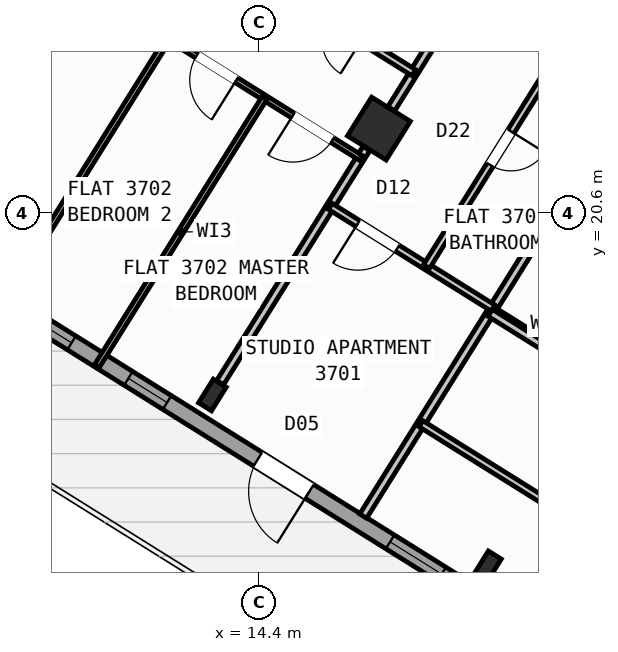
"""IFC4 building model, lengths in metres.
Left out: names, types, materials, properties, quantities, classifications, styles, units other than length and angle.
Written with IfcOpenShell. Run it as: python <this file> out.ifc"""

import sys

from ifc_helpers import new_model, si_unit, direction, frame, frame_2d, origin, origin_2d, place, context, subcontext, project, spatial, rectangle, hollow_rectangle, i_section, extrude, source, transform, mapped, element, fill, save


model = new_model("IFC4")
c1 = context("Model", 3, precision=1e-05, world=origin(), true_north=direction((0.0, 1.0)))
c2 = subcontext(c1, "Body", "Model", "MODEL_VIEW")
j1 = project(units=[si_unit("LENGTHUNIT", "METRE"), si_unit("PLANEANGLEUNIT", "RADIAN")], contexts=[c1])
p1 = place(None, origin())
s1 = spatial("IfcSite", under=j1, at=p1, CompositionType="ELEMENT")
p2 = place(p1, origin())
s2 = spatial("IfcBuilding", under=s1, at=p2, CompositionType="ELEMENT")
p3 = place(p2, frame((0.0, 0.0, 147.9)))
s3 = spatial("IfcBuildingStorey", under=s2, at=p3, CompositionType="ELEMENT", Elevation=147.9)
m1 = source(origin(), c2, "Body", "SweptSolid", [
    extrude(i_section(OverallWidth=0.3, OverallDepth=0.55, WebThickness=0.015, FlangeThickness=0.029, at=origin_2d()), origin(), (0.0, 0.0, 1.0), 3.6),
])
p4 = place(p3, frame((18.906, 13.612, 0.0), z_axis=(0.0, 0.0, 1.0), x_axis=(-0.848048096156, 0.529919264233, 0.0)))
e1 = element("IfcColumn", 1, at=p4, inside=s3, PredefinedType="COLUMN", context=c2, shape_type="MappedRepresentation", body=[
    mapped(m1, transform((0.0, 0.0, 0.0), scale=1.0)),
])
m2 = source(origin(), c2, "Body", "SweptSolid", [
    extrude(hollow_rectangle(XDim=0.9, YDim=0.9, WallThickness=0.036, at=origin_2d()), origin(), (0.0, 0.0, 1.0), 3.6),
])
p5 = place(p3, frame((16.764, 22.261, 0.0), z_axis=(0.0, 0.0, 1.0), x_axis=(-0.848048096156, 0.529919264233, 0.0)))
e2 = element("IfcColumn", 2, at=p5, inside=s3, PredefinedType="COLUMN", context=c2, shape_type="MappedRepresentation", body=[
    mapped(m2, transform((0.0, 0.0, 0.0), scale=1.0)),
])
p6 = place(p3, frame((13.478, 17.003, 0.0), z_axis=(0.0, 0.0, 1.0), x_axis=(-0.848048096156, 0.529919264233, 0.0)))
e3 = element("IfcColumn", 3, at=p6, inside=s3, PredefinedType="COLUMN", context=c2, shape_type="MappedRepresentation", body=[
    mapped(m1, transform((0.0, 0.0, 0.0), scale=1.0)),
])
p7 = place(p3, frame((29.268, 6.429, 0.0), z_axis=(0.0, 0.0, 1.0), x_axis=(-0.848049971435, 0.529916263149, 0.0)))
e4 = element("IfcWall", 4, at=p7, inside=s3, PredefinedType="STANDARD", context=c2, shape_type="SweptSolid", body=[
    extrude(rectangle(XDim=31.588, YDim=0.32, at=frame_2d((15.794, 0.0))), origin(), (0.0, 0.0, 1.0), 3.35),
])
p8 = place(p7, frame((16.362, 0.0, 0.0)))
e5 = element("IfcOpeningElement", 5, at=p8, cuts=e4, PredefinedType="OPENING", context=c2, shape_type="SweptSolid", body=[
    extrude(rectangle(XDim=1.2, YDim=2.15, at=frame_2d((0.6, 1.075))), frame((0.0, 0.17, 0.0), z_axis=(0.0, -1.0, 0.0), x_axis=(1.0, 0.0, 0.0)), (0.0, 0.0, 1.0), 0.34),
])
p9 = place(p7, frame((2.989, 0.0, 0.8)))
e6 = element("IfcOpeningElement", 6, at=p9, cuts=e4, PredefinedType="OPENING", context=c2, shape_type="SweptSolid", body=[
    extrude(rectangle(XDim=2.1, YDim=1.55, at=frame_2d((1.05, 0.775))), frame((0.0, 0.17, 0.0), z_axis=(0.0, -1.0, 0.0), x_axis=(1.0, 0.0, 0.0)), (0.0, 0.0, 1.0), 0.34),
])
p10 = place(p7, frame((8.359, 0.0, 0.8)))
e7 = element("IfcOpeningElement", 7, at=p10, cuts=e4, PredefinedType="OPENING", context=c2, shape_type="SweptSolid", body=[
    extrude(rectangle(XDim=2.1, YDim=1.55, at=frame_2d((1.05, 0.775))), frame((0.0, 0.17, 0.0), z_axis=(0.0, -1.0, 0.0), x_axis=(1.0, 0.0, 0.0)), (0.0, 0.0, 1.0), 0.34),
])
p11 = place(p7, frame((13.284, 0.0, 0.95)))
e8 = element("IfcOpeningElement", 8, at=p11, cuts=e4, PredefinedType="OPENING", context=c2, shape_type="SweptSolid", body=[
    extrude(rectangle(XDim=1.2, YDim=1.4, at=frame_2d((0.6, 0.7))), frame((0.0, 0.17, 0.0), z_axis=(0.0, -1.0, 0.0), x_axis=(1.0, 0.0, 0.0)), (0.0, 0.0, 1.0), 0.34),
])
p12 = place(p7, frame((29.188, 0.0, 0.95)))
e9 = element("IfcOpeningElement", 9, at=p12, cuts=e4, PredefinedType="OPENING", context=c2, shape_type="SweptSolid", body=[
    extrude(rectangle(XDim=1.2, YDim=1.4, at=frame_2d((0.6, 0.7))), frame((0.0, 0.17, 0.0), z_axis=(0.0, -1.0, 0.0), x_axis=(1.0, 0.0, 0.0)), (0.0, 0.0, 1.0), 0.34),
])
p13 = place(p7, frame((19.674, 0.0, 1.0)))
e10 = element("IfcOpeningElement", 10, at=p13, cuts=e4, PredefinedType="OPENING", context=c2, shape_type="SweptSolid", body=[
    extrude(rectangle(XDim=0.9, YDim=1.25, at=frame_2d((0.45, 0.625))), frame((0.0, 0.17, 0.0), z_axis=(0.0, -1.0, 0.0), x_axis=(1.0, 0.0, 0.0)), (0.0, 0.0, 1.0), 0.34),
])
p14 = place(p7, frame((21.896, 0.0, 1.0)))
e11 = element("IfcOpeningElement", 11, at=p14, cuts=e4, PredefinedType="OPENING", context=c2, shape_type="SweptSolid", body=[
    extrude(rectangle(XDim=0.9, YDim=1.25, at=frame_2d((0.45, 0.625))), frame((0.0, 0.17, 0.0), z_axis=(0.0, -1.0, 0.0), x_axis=(1.0, 0.0, 0.0)), (0.0, 0.0, 1.0), 0.34),
])
p15 = place(p7, frame((24.106, 0.0, 1.0)))
e12 = element("IfcOpeningElement", 12, at=p15, cuts=e4, PredefinedType="OPENING", context=c2, shape_type="SweptSolid", body=[
    extrude(rectangle(XDim=0.65, YDim=1.15, at=frame_2d((0.325, 0.575))), frame((0.0, 0.17, 0.0), z_axis=(0.0, -1.0, 0.0), x_axis=(1.0, 0.0, 0.0)), (0.0, 0.0, 1.0), 0.34),
])
p16 = place(p7, frame((26.366, 0.0, 1.0)))
e13 = element("IfcOpeningElement", 13, at=p16, cuts=e4, PredefinedType="OPENING", context=c2, shape_type="SweptSolid", body=[
    extrude(rectangle(XDim=0.9, YDim=1.25, at=frame_2d((0.45, 0.625))), frame((0.0, 0.17, 0.0), z_axis=(0.0, -1.0, 0.0), x_axis=(1.0, 0.0, 0.0)), (0.0, 0.0, 1.0), 0.34),
])
p17 = place(p3, frame((2.415, 23.452, 0.0), z_axis=(0.0, 0.0, 1.0), x_axis=(0.52991049553, 0.848053575387, 0.0)))
e14 = element("IfcWall", 14, at=p17, inside=s3, PredefinedType="STANDARD", context=c2, shape_type="SweptSolid", body=[
    extrude(rectangle(XDim=21.587, YDim=0.32, at=frame_2d((10.794, 0.0))), origin(), (0.0, 0.0, 1.0), 2.775),
])
p18 = place(p17, frame((2.356, 0.0, 0.8)))
e15 = element("IfcOpeningElement", 15, at=p18, cuts=e14, PredefinedType="OPENING", context=c2, shape_type="SweptSolid", body=[
    extrude(rectangle(XDim=2.1, YDim=1.55, at=frame_2d((1.05, 0.775))), frame((0.0, 0.17, 0.0), z_axis=(0.0, -1.0, 0.0), x_axis=(1.0, 0.0, 0.0)), (0.0, 0.0, 1.0), 0.34),
])
p19 = place(p17, frame((8.639, 0.0, 1.0)))
e16 = element("IfcOpeningElement", 16, at=p19, cuts=e14, PredefinedType="OPENING", context=c2, shape_type="SweptSolid", body=[
    extrude(rectangle(XDim=0.9, YDim=1.25, at=frame_2d((0.45, 0.625))), frame((0.0, 0.17, 0.0), z_axis=(0.0, -1.0, 0.0), x_axis=(1.0, 0.0, 0.0)), (0.0, 0.0, 1.0), 0.34),
])
p20 = place(p17, frame((17.744, 0.0, 0.85)))
e17 = element("IfcOpeningElement", 17, at=p20, cuts=e14, PredefinedType="OPENING", context=c2, shape_type="SweptSolid", body=[
    extrude(rectangle(XDim=1.5, YDim=1.5, at=frame_2d((0.75, 0.75))), frame((0.0, 0.17, 0.0), z_axis=(0.0, -1.0, 0.0), x_axis=(1.0, 0.0, 0.0)), (0.0, 0.0, 1.0), 0.34),
])
p21 = place(p3, frame((21.206, 17.292, 0.0), z_axis=(0.0, 0.0, 1.0), x_axis=(-0.848050851465, 0.529914854792, 0.0)))
e18 = element("IfcWall", 18, at=p21, inside=s3, PredefinedType="PARTITIONING", context=c2, shape_type="SweptSolid", body=[
    extrude(rectangle(XDim=2.61, YDim=0.16, at=frame_2d((1.305, 0.0))), origin(), (0.0, 0.0, 1.0), 3.34),
])
p22 = place(p3, frame((21.938, 23.391, 0.0), z_axis=(0.0, 0.0, 1.0), x_axis=(-0.529924725692, -0.848044683434, 0.0)))
e19 = element("IfcWall", 19, at=p22, inside=s3, PredefinedType="PARTITIONING", context=c2, shape_type="SweptSolid", body=[
    extrude(rectangle(XDim=10.35, YDim=0.16, at=frame_2d((5.175, 0.0))), origin(), (0.0, 0.0, 1.0), 3.34),
])
p23 = place(p3, frame((21.938, 23.391, 0.0), z_axis=(0.0, 0.0, 1.0), x_axis=(-0.848045850158, 0.529922858565, 0.0)))
e20 = element("IfcWall", 20, at=p23, inside=s3, PredefinedType="PARTITIONING", context=c2, shape_type="SweptSolid", body=[
    extrude(rectangle(XDim=16.73, YDim=0.16, at=frame_2d((8.365, 0.0))), origin(), (0.0, 0.0, 1.0), 3.34),
])
p24 = place(p23, frame((2.22, 0.0, 0.0)))
e21 = element("IfcOpeningElement", 21, at=p24, cuts=e20, PredefinedType="OPENING", context=c2, shape_type="SweptSolid", body=[
    extrude(rectangle(XDim=0.86, YDim=2.05, at=frame_2d((0.43, 1.025))), frame((0.0, 0.09, 0.0), z_axis=(0.0, -1.0, 0.0), x_axis=(1.0, 0.0, 0.0)), (0.0, 0.0, 1.0), 0.18),
])
p25 = place(p23, frame((14.22, 0.0, 0.0)))
e22 = element("IfcOpeningElement", 22, at=p25, cuts=e20, PredefinedType="OPENING", context=c2, shape_type="SweptSolid", body=[
    extrude(rectangle(XDim=1.0, YDim=2.1, at=frame_2d((0.5, 1.05))), frame((0.0, 0.09, 0.0), z_axis=(0.0, -1.0, 0.0), x_axis=(1.0, 0.0, 0.0)), (0.0, 0.0, 1.0), 0.18),
])
p26 = place(p3, frame((18.724, 25.399, 0.0), z_axis=(0.0, 0.0, 1.0), x_axis=(-0.529890499457, -0.848066069705, 0.0)))
e23 = element("IfcWall", 23, at=p26, inside=s3, PredefinedType="PARTITIONING", context=c2, shape_type="SweptSolid", body=[
    extrude(rectangle(XDim=3.238, YDim=0.16, at=frame_2d((1.619, 0.0))), origin(), (0.0, 0.0, 1.0), 2.775),
])
p27 = place(p3, frame((16.519, 21.87, 0.0), z_axis=(0.0, 0.0, 1.0), x_axis=(-0.529922447305, -0.848046107144, 0.0)))
e24 = element("IfcWall", 24, at=p27, inside=s3, PredefinedType="PARTITIONING", context=c2, shape_type="SweptSolid", body=[
    extrude(rectangle(XDim=5.451, YDim=0.16, at=frame_2d((2.726, 0.0))), origin(), (0.0, 0.0, 1.0), 2.775),
])
p28 = place(p3, frame((19.019, 18.718, 0.0), z_axis=(0.0, 0.0, 1.0), x_axis=(-0.848059820872, 0.529900500304, 0.0)))
e25 = element("IfcWall", 25, at=p28, inside=s3, PredefinedType="PLUMBINGWALL", context=c2, shape_type="SweptSolid", body=[
    extrude(rectangle(XDim=3.79, YDim=0.14, at=frame_2d((1.895, 0.0))), origin(), (0.0, 0.0, 1.0), 3.34),
])
p29 = place(p28, frame((2.23, 0.0, 0.0)))
e26 = element("IfcOpeningElement", 26, at=p29, cuts=e25, PredefinedType="OPENING", context=c2, shape_type="SweptSolid", body=[
    extrude(rectangle(XDim=0.92, YDim=2.08, at=frame_2d((0.46, 1.04))), frame((0.0, 0.08, 0.0), z_axis=(0.0, -1.0, 0.0), x_axis=(1.0, 0.0, 0.0)), (0.0, 0.0, 1.0), 0.16),
])
p30 = place(p3, frame((20.624, 24.212, 0.0), z_axis=(0.0, 0.0, 1.0), x_axis=(-0.529919283494, -0.848048084121, 0.0)))
e27 = element("IfcWall", 27, at=p30, inside=s3, PredefinedType="PLUMBINGWALL", context=c2, shape_type="SweptSolid", body=[
    extrude(rectangle(XDim=5.51, YDim=0.14, at=frame_2d((2.755, 0.0))), origin(), (0.0, 0.0, 1.0), 2.995),
])
p31 = place(p30, frame((2.365, 0.0, 0.0)))
e28 = element("IfcOpeningElement", 28, at=p31, cuts=e27, PredefinedType="OPENING", context=c2, shape_type="SweptSolid", body=[
    extrude(rectangle(XDim=0.78, YDim=2.05, at=frame_2d((0.39, 1.025))), frame((0.0, 0.08, 0.0), z_axis=(0.0, -1.0, 0.0), x_axis=(1.0, 0.0, 0.0)), (0.0, 0.0, 1.0), 0.16),
])
p32 = place(p3, frame((11.143, 30.136, 0.0), z_axis=(0.0, 0.0, 1.0), x_axis=(-0.529922479612, -0.848046086956, 0.0)))
e29 = element("IfcWall", 29, at=p32, inside=s3, PredefinedType="PARTITIONING", context=c2, shape_type="SweptSolid", body=[
    extrude(rectangle(XDim=10.62, YDim=0.11, at=frame_2d((5.31, 0.0))), origin(), (0.0, 0.0, 1.0), 3.34),
])
p33 = place(p32, frame((3.0, 0.0, 0.0)))
e30 = element("IfcOpeningElement", 30, at=p33, cuts=e29, PredefinedType="OPENING", context=c2, shape_type="SweptSolid", body=[
    extrude(rectangle(XDim=0.78, YDim=2.05, at=frame_2d((0.39, 1.025))), frame((0.0, 0.065, 0.0), z_axis=(0.0, -1.0, 0.0), x_axis=(1.0, 0.0, 0.0)), (0.0, 0.0, 1.0), 0.13),
])
p34 = place(p3, frame((17.452, 23.364, 0.0), z_axis=(0.0, 0.0, 1.0), x_axis=(-0.848044326704, 0.52992529657, 0.0)))
e31 = element("IfcWall", 31, at=p34, inside=s3, PredefinedType="PLUMBINGWALL", context=c2, shape_type="SweptSolid", body=[
    extrude(rectangle(XDim=8.94, YDim=0.14, at=frame_2d((4.47, 0.0))), origin(), (0.0, 0.0, 1.0), 3.34),
])
p35 = place(p34, frame((5.087, 0.0, 0.0)))
e32 = element("IfcOpeningElement", 32, at=p35, cuts=e31, PredefinedType="OPENING", context=c2, shape_type="SweptSolid", body=[
    extrude(rectangle(XDim=0.78, YDim=2.05, at=frame_2d((0.39, 1.025))), frame((0.0, 0.08, 0.0), z_axis=(0.0, -1.0, 0.0), x_axis=(1.0, 0.0, 0.0)), (0.0, 0.0, 1.0), 0.16),
])
p36 = place(p34, frame((1.218, 0.0, 0.0)))
e33 = element("IfcOpeningElement", 33, at=p36, cuts=e31, PredefinedType="OPENING", context=c2, shape_type="SweptSolid", body=[
    extrude(rectangle(XDim=0.78, YDim=2.05, at=frame_2d((0.39, 1.025))), frame((0.0, 0.08, 0.0), z_axis=(0.0, -1.0, 0.0), x_axis=(1.0, 0.0, 0.0)), (0.0, 0.0, 1.0), 0.16),
])
p37 = place(p3, frame((16.403, 21.685, 0.0), z_axis=(0.0, 0.0, 1.0), x_axis=(-0.848044326704, 0.52992529657, 0.0)))
e34 = element("IfcWall", 34, at=p37, inside=s3, PredefinedType="PARTITIONING", context=c2, shape_type="SweptSolid", body=[
    extrude(rectangle(XDim=8.94, YDim=0.11, at=frame_2d((4.47, 0.0))), origin(), (0.0, 0.0, 1.0), 3.34),
])
p38 = place(p37, frame((0.657, 0.0, 0.0)))
e35 = element("IfcOpeningElement", 35, at=p38, cuts=e34, PredefinedType="OPENING", context=c2, shape_type="SweptSolid", body=[
    extrude(rectangle(XDim=0.92, YDim=2.08, at=frame_2d((0.46, 1.04))), frame((0.0, 0.065, 0.0), z_axis=(0.0, -1.0, 0.0), x_axis=(1.0, 0.0, 0.0)), (0.0, 0.0, 1.0), 0.13),
])
p39 = place(p37, frame((2.893, 0.0, 0.0)))
e36 = element("IfcOpeningElement", 36, at=p39, cuts=e34, PredefinedType="OPENING", context=c2, shape_type="SweptSolid", body=[
    extrude(rectangle(XDim=0.92, YDim=2.08, at=frame_2d((0.46, 1.04))), frame((0.0, 0.065, 0.0), z_axis=(0.0, -1.0, 0.0), x_axis=(1.0, 0.0, 0.0)), (0.0, 0.0, 1.0), 0.13),
])
p40 = place(p37, frame((5.008, 0.0, 0.0)))
e37 = element("IfcOpeningElement", 37, at=p40, cuts=e34, PredefinedType="OPENING", context=c2, shape_type="SweptSolid", body=[
    extrude(rectangle(XDim=0.92, YDim=2.08, at=frame_2d((0.46, 1.04))), frame((0.0, 0.065, 0.0), z_axis=(0.0, -1.0, 0.0), x_axis=(1.0, 0.0, 0.0)), (0.0, 0.0, 1.0), 0.13),
])
p41 = place(p37, frame((7.363, 0.0, 0.0)))
e38 = element("IfcOpeningElement", 38, at=p41, cuts=e34, PredefinedType="OPENING", context=c2, shape_type="SweptSolid", body=[
    extrude(rectangle(XDim=0.92, YDim=2.08, at=frame_2d((0.46, 1.04))), frame((0.0, 0.065, 0.0), z_axis=(0.0, -1.0, 0.0), x_axis=(1.0, 0.0, 0.0)), (0.0, 0.0, 1.0), 0.13),
])
for number, where, z_axis, x_axis in (
    (39, (14.508, 22.869, 0.0), (0.0, 0.0, 1.0), (-0.53, -0.848, 0.0)),
    (40, (12.613, 24.053, 0.0), (0.0, 0.0, 1.0), (-0.53, -0.848, 0.0)),
):
    element("IfcWall", number, at=place(p3, frame(where, z_axis=z_axis, x_axis=x_axis)), inside=s3, PredefinedType="PARTITIONING", context=c2, shape_type="SweptSolid", body=[
        extrude(rectangle(XDim=6.24, YDim=0.11, at=frame_2d((3.12, 0.0))), origin(), (0.0, 0.0, 1.0), 2.995),
    ])
p42 = place(p3, frame((10.717, 25.238, 0.0), z_axis=(0.0, 0.0, 1.0), x_axis=(-0.52991804857, -0.848048855786, 0.0)))
e41 = element("IfcWall", 41, at=p42, inside=s3, PredefinedType="PARTITIONING", context=c2, shape_type="SweptSolid", body=[
    extrude(rectangle(XDim=6.24, YDim=0.11, at=frame_2d((3.12, 0.0))), origin(), (0.0, 0.0, 1.0), 3.34),
])
p43 = place(p3, frame((32.164, 10.374, 0.0), z_axis=(0.0, 0.0, 1.0), x_axis=(-0.848044107957, 0.529925646633, 0.0)))
e42 = element("IfcWall", 42, at=p43, inside=s3, PredefinedType="PARTITIONING", context=c2, shape_type="SweptSolid", body=[
    extrude(rectangle(XDim=15.57, YDim=0.16, at=frame_2d((7.785, 0.0))), origin(), (0.0, 0.0, 1.0), 3.34),
])
p44 = place(p43, frame((10.83, 0.0, 0.0)))
e43 = element("IfcOpeningElement", 43, at=p44, cuts=e42, PredefinedType="OPENING", context=c2, shape_type="SweptSolid", body=[
    extrude(rectangle(XDim=1.0, YDim=2.1, at=frame_2d((0.5, 1.05))), frame((0.0, 0.09, 0.0), z_axis=(0.0, -1.0, 0.0), x_axis=(1.0, 0.0, 0.0)), (0.0, 0.0, 1.0), 0.18),
])
p45 = place(p3, frame((29.72, 8.859, 0.0), z_axis=(0.0, 0.0, 1.0), x_axis=(-0.848049134363, 0.529917602752, 0.0)))
e44 = element("IfcWall", 44, at=p45, inside=s3, PredefinedType="PLUMBINGWALL", context=c2, shape_type="SweptSolid", body=[
    extrude(rectangle(XDim=14.3, YDim=0.14, at=frame_2d((7.15, 0.0))), origin(), (0.0, 0.0, 1.0), 3.34),
])
p46 = place(p45, frame((9.57, 0.0, 0.0)))
e45 = element("IfcOpeningElement", 45, at=p46, cuts=e44, PredefinedType="OPENING", context=c2, shape_type="SweptSolid", body=[
    extrude(rectangle(XDim=0.92, YDim=2.08, at=frame_2d((0.46, 1.04))), frame((0.0, 0.08, 0.0), z_axis=(0.0, -1.0, 0.0), x_axis=(1.0, 0.0, 0.0)), (0.0, 0.0, 1.0), 0.16),
])
m3 = source(origin(), c2, "Body", "SweptSolid", [
    extrude(rectangle(XDim=1.2, YDim=2.15, at=frame_2d((0.6, 1.075))), frame((0.0, 0.025, 0.0), z_axis=(0.0, -1.0, 0.0), x_axis=(1.0, 0.0, 0.0)), (0.0, 0.0, 1.0), 0.05),
])
p47 = place(p8, origin())
e46 = element("IfcDoor", 46, at=p47, inside=s3, OperationType="SINGLE_SWING_LEFT", PredefinedType="DOOR", context=c2, shape_type="MappedRepresentation", body=[
    mapped(m3, transform((0.0, 0.0, 0.0), scale=1.0)),
])
fill(e5, e46)
m4 = source(origin(), c2, "Body", "SweptSolid", [
    extrude(rectangle(XDim=1.2, YDim=1.4, at=frame_2d((0.6, 0.7))), frame((0.0, 0.03, 0.0), z_axis=(0.0, -1.0, 0.0), x_axis=(1.0, 0.0, 0.0)), (0.0, 0.0, 1.0), 0.06),
])
p48 = place(p11, origin())
e47 = element("IfcWindow", 47, at=p48, inside=s3, PartitioningType="SINGLE_PANEL", PredefinedType="WINDOW", context=c2, shape_type="MappedRepresentation", body=[
    mapped(m4, transform((0.0, 0.0, 0.0), scale=1.0)),
])
fill(e8, e47)
m5 = source(origin(), c2, "Body", "SweptSolid", [
    extrude(rectangle(XDim=0.9, YDim=1.25, at=frame_2d((0.45, 0.625))), frame((0.0, 0.03, 0.0), z_axis=(0.0, -1.0, 0.0), x_axis=(1.0, 0.0, 0.0)), (0.0, 0.0, 1.0), 0.06),
])
p49 = place(p13, origin())
e48 = element("IfcWindow", 48, at=p49, inside=s3, PartitioningType="SINGLE_PANEL", PredefinedType="WINDOW", context=c2, shape_type="MappedRepresentation", body=[
    mapped(m5, transform((0.0, 0.0, 0.0), scale=1.0)),
])
fill(e10, e48)
p50 = place(p14, origin())
e49 = element("IfcWindow", 49, at=p50, inside=s3, PartitioningType="SINGLE_PANEL", PredefinedType="WINDOW", context=c2, shape_type="MappedRepresentation", body=[
    mapped(m5, transform((0.0, 0.0, 0.0), scale=1.0)),
])
fill(e11, e49)
m6 = source(origin(), c2, "Body", "SweptSolid", [
    extrude(rectangle(XDim=0.92, YDim=2.08, at=frame_2d((0.46, 1.04))), frame((0.0, 0.025, 0.0), z_axis=(0.0, -1.0, 0.0), x_axis=(1.0, 0.0, 0.0)), (0.0, 0.0, 1.0), 0.05),
])
p51 = place(p29, origin())
e50 = element("IfcDoor", 50, at=p51, inside=s3, OperationType="SINGLE_SWING_RIGHT", PredefinedType="DOOR", context=c2, shape_type="MappedRepresentation", body=[
    mapped(m6, transform((0.0, 0.0, 0.0), scale=1.0)),
])
fill(e26, e50)
m7 = source(origin(), c2, "Body", "SweptSolid", [
    extrude(rectangle(XDim=0.78, YDim=2.05, at=frame_2d((0.39, 1.025))), frame((0.0, 0.025, 0.0), z_axis=(0.0, -1.0, 0.0), x_axis=(1.0, 0.0, 0.0)), (0.0, 0.0, 1.0), 0.05),
])
p52 = place(p31, origin())
e51 = element("IfcDoor", 51, at=p52, inside=s3, OperationType="SINGLE_SWING_LEFT", PredefinedType="DOOR", context=c2, shape_type="MappedRepresentation", body=[
    mapped(m7, transform((0.0, 0.0, 0.0), scale=1.0)),
])
fill(e28, e51)
p53 = place(p38, origin())
e52 = element("IfcDoor", 52, at=p53, inside=s3, OperationType="SINGLE_SWING_RIGHT", PredefinedType="DOOR", context=c2, shape_type="MappedRepresentation", body=[
    mapped(m6, transform((0.0, 0.0, 0.0), scale=1.0)),
])
fill(e35, e52)
p54 = place(p39, origin())
e53 = element("IfcDoor", 53, at=p54, inside=s3, OperationType="SINGLE_SWING_LEFT", PredefinedType="DOOR", context=c2, shape_type="MappedRepresentation", body=[
    mapped(m6, transform((0.0, 0.0, 0.0), scale=1.0)),
])
fill(e36, e53)
save(model, sys.argv[1])
